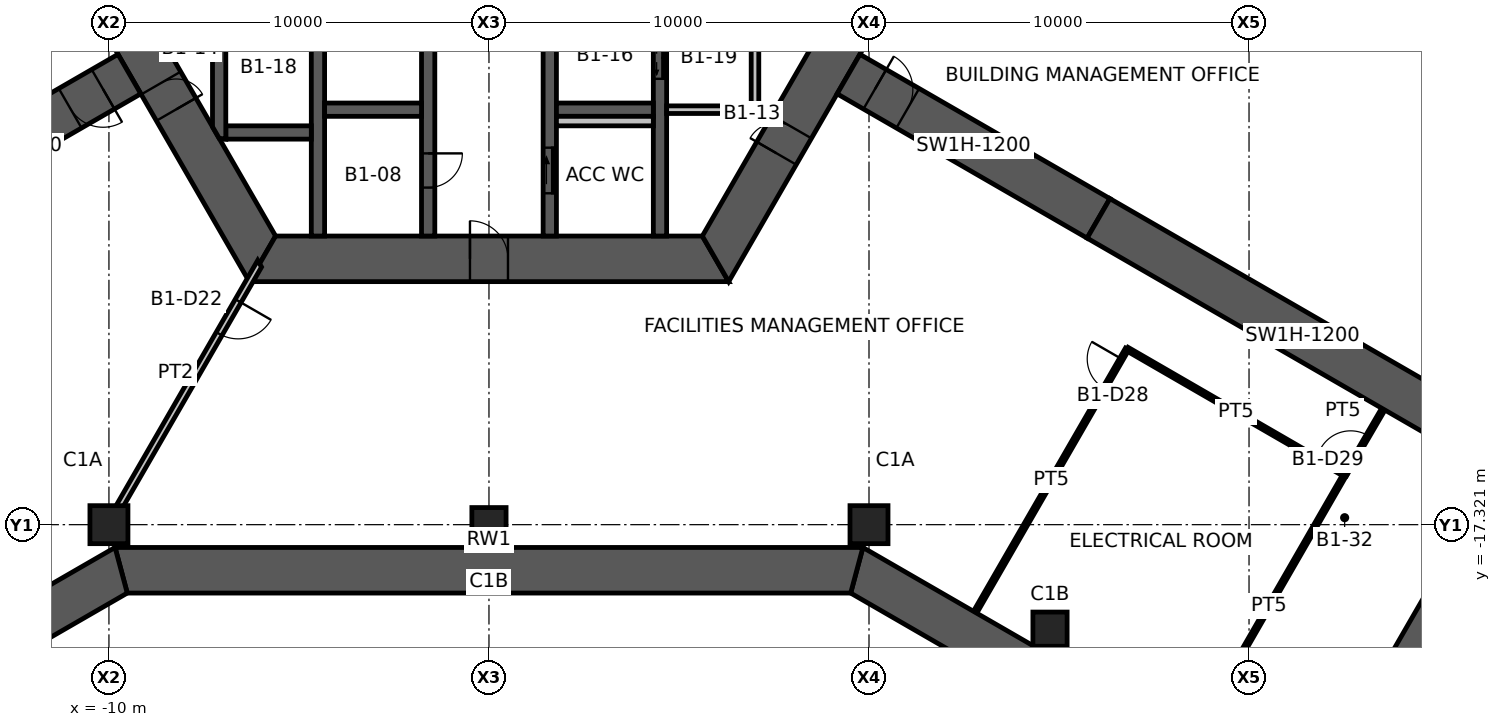
"""IFC4 building model, lengths in metres.
Left out: names, types, materials, properties, quantities, classifications, styles, units other than length and angle.
Written with IfcOpenShell. Run it as: python <this file> out.ifc"""

import sys

from ifc_helpers import new_model, si_unit, direction, frame, frame_2d, origin, origin_2d, place, context, subcontext, project, spatial, polyline, rectangle, hollow_rectangle, outline, extrude, element, fill, save


model = new_model("IFC4")
c1 = context("Model", 3, precision=1e-05, world=origin(), true_north=direction((0.0, 1.0)))
c2 = subcontext(c1, "Body", "Model", "MODEL_VIEW")
j1 = project(units=[si_unit("LENGTHUNIT", "METRE"), si_unit("PLANEANGLEUNIT", "RADIAN")], contexts=[c1])
p1 = place(None, origin())
s1 = spatial("IfcSite", under=j1, at=p1, CompositionType="ELEMENT")
p2 = place(p1, origin())
s2 = spatial("IfcBuilding", under=s1, at=p2, CompositionType="ELEMENT")
p3 = place(p2, frame((0.0, 0.0, -5.0)))
s3 = spatial("IfcBuildingStorey", under=s2, at=p3, CompositionType="ELEMENT", Elevation=-5.0)
for number, where, z_axis, x_axis in (
    (1, (-10.0, -17.321, 0.0), (0.0, 0.0, 1.0), (1.0, 0.0, 0.0)),
    (2, (10.0, -17.321, 0.0), (0.0, 0.0, 1.0), (1.0, 0.0, 0.0)),
):
    element("IfcColumn", number, at=place(p3, frame(where, z_axis=z_axis, x_axis=x_axis)), inside=s3, PredefinedType="COLUMN", context=c2, shape_type="SweptSolid", body=[
        extrude(hollow_rectangle(XDim=1.0, YDim=1.0, WallThickness=0.06, at=origin_2d()), origin(), (0.0, 0.0, 1.0), 5.0),
    ])
for number, where, z_axis, x_axis in (
    (3, (0.0, -17.321, 0.0), (0.0, 0.0, 1.0), (1.0, 0.0, 0.0)),
    (4, (14.763, -20.071, 0.0), (0.0, 0.0, 1.0), (1.0, 0.0, 0.0)),
):
    element("IfcColumn", number, at=place(p3, frame(where, z_axis=z_axis, x_axis=x_axis)), inside=s3, PredefinedType="COLUMN", context=c2, shape_type="SweptSolid", body=[
        extrude(hollow_rectangle(XDim=0.9, YDim=0.9, WallThickness=0.05, at=origin_2d()), origin(), (0.0, 0.0, 1.0), 5.0),
    ])
p4 = place(p3, frame((-11.922, 0.0, 0.0), z_axis=(0.0, 0.0, 1.0), x_axis=(0.500004296715, -0.866022923061, 0.0)))
e5 = element("IfcWall", 5, at=p4, inside=s3, PredefinedType="SHEAR", context=c2, shape_type="SweptSolid", body=[
    extrude(outline(polyline([(-0.346, -0.6), (6.581, -0.6), (7.381, -0.6), (12.269, -0.6), (11.576, 0.6), (7.381, 0.6), (6.581, 0.6), (0.346, 0.6), (-0.346, -0.6)])), origin(), (0.0, 0.0, 1.0), 5.0),
])
p5 = place(p4, frame((6.581, 0.0, 0.0)))
e6 = element("IfcOpeningElement", 6, at=p5, cuts=e5, PredefinedType="OPENING", context=c2, shape_type="SweptSolid", body=[
    extrude(rectangle(XDim=0.8, YDim=2.1, at=frame_2d((0.4, 1.05))), frame((0.0, 0.61, 0.0), z_axis=(0.0, -1.0, 0.0), x_axis=(1.0, 0.0, 0.0)), (0.0, 0.0, 1.0), 1.22),
])
p6 = place(p3, frame((-5.961, -10.325, 0.0), z_axis=(0.0, 0.0, 1.0), x_axis=(1.0, 0.0, 0.0)))
e7 = element("IfcWall", 7, at=p6, inside=s3, PredefinedType="SHEAR", context=c2, shape_type="SweptSolid", body=[
    extrude(outline(polyline([(-0.346, -0.6), (5.461, -0.6), (6.461, -0.6), (12.269, -0.6), (11.576, 0.6), (6.461, 0.6), (5.461, 0.6), (0.346, 0.6), (-0.346, -0.6)])), origin(), (0.0, 0.0, 1.0), 5.0),
])
p7 = place(p6, frame((5.461, 0.0, 0.0)))
e8 = element("IfcOpeningElement", 8, at=p7, cuts=e7, PredefinedType="OPENING", context=c2, shape_type="SweptSolid", body=[
    extrude(rectangle(XDim=1.0, YDim=2.1, at=frame_2d((0.5, 1.05))), frame((0.0, 0.61, 0.0), z_axis=(0.0, -1.0, 0.0), x_axis=(1.0, 0.0, 0.0)), (0.0, 0.0, 1.0), 1.22),
])
p8 = place(p3, frame((5.961, -10.325, 0.0), z_axis=(0.0, 0.0, 1.0), x_axis=(0.500004296715, 0.866022923061, 0.0)))
e9 = element("IfcWall", 9, at=p8, inside=s3, PredefinedType="SHEAR", context=c2, shape_type="SweptSolid", body=[
    extrude(outline(polyline([(-0.346, -0.6), (3.208, -0.6), (4.009, -0.6), (12.269, -0.6), (11.576, 0.6), (4.009, 0.6), (3.208, 0.6), (0.346, 0.6), (-0.346, -0.6)])), origin(), (0.0, 0.0, 1.0), 5.0),
])
p9 = place(p8, frame((3.208, 0.0, 0.0)))
e10 = element("IfcOpeningElement", 10, at=p9, cuts=e9, PredefinedType="OPENING", context=c2, shape_type="SweptSolid", body=[
    extrude(rectangle(XDim=0.8, YDim=2.1, at=frame_2d((0.4, 1.05))), frame((0.0, 0.61, 0.0), z_axis=(0.0, -1.0, 0.0), x_axis=(1.0, 0.0, 0.0)), (0.0, 0.0, 1.0), 1.22),
])
p10 = place(p3, frame((-9.461, -5.462, 0.0), z_axis=(0.0, 0.0, 1.0), x_axis=(-0.866019116917, -0.500010889016, 0.0)))
e11 = element("IfcWall", 11, at=p10, inside=s3, PredefinedType="SHEAR", context=c2, shape_type="SweptSolid", body=[
    extrude(rectangle(XDim=7.595, YDim=1.2, at=frame_2d((3.798, 0.0))), origin(), (0.0, 0.0, 1.0), 5.0),
])
p11 = place(p10, frame((0.8, 0.0, 0.0)))
e12 = element("IfcOpeningElement", 12, at=p11, cuts=e11, PredefinedType="OPENING", context=c2, shape_type="SweptSolid", body=[
    extrude(rectangle(XDim=1.0, YDim=2.1, at=frame_2d((0.5, 1.05))), frame((0.0, 0.61, 0.0), z_axis=(0.0, -1.0, 0.0), x_axis=(1.0, 0.0, 0.0)), (0.0, 0.0, 1.0), 1.22),
])
p12 = place(p3, frame((9.461, -5.462, 0.0), z_axis=(0.0, 0.0, 1.0), x_axis=(0.866019116917, -0.500010889016, 0.0)))
e13 = element("IfcWall", 13, at=p12, inside=s3, PredefinedType="SHEAR", context=c2, shape_type="SweptSolid", body=[
    extrude(rectangle(XDim=7.595, YDim=1.2, at=frame_2d((3.798, 0.0))), origin(), (0.0, 0.0, 1.0), 5.0),
])
p13 = place(p12, frame((0.8, 0.0, 0.0)))
e14 = element("IfcOpeningElement", 14, at=p13, cuts=e13, PredefinedType="OPENING", context=c2, shape_type="SweptSolid", body=[
    extrude(rectangle(XDim=1.0, YDim=2.1, at=frame_2d((0.5, 1.05))), frame((0.0, 0.61, 0.0), z_axis=(0.0, -1.0, 0.0), x_axis=(1.0, 0.0, 0.0)), (0.0, 0.0, 1.0), 1.22),
])
p14 = place(p3, frame((16.039, -9.26, 0.0), z_axis=(0.0, 0.0, 1.0), x_axis=(0.866023285932, -0.50000366821, 0.0)))
e15 = element("IfcWall", 15, at=p14, inside=s3, PredefinedType="SHEAR", context=c2, shape_type="SweptSolid", body=[
    extrude(rectangle(XDim=12.4, YDim=1.2, at=frame_2d((6.2, 0.0))), origin(), (0.0, 0.0, 1.0), 5.0),
])
p15 = place(p3, frame((20.878, 0.878, 0.0), z_axis=(0.0, 0.0, 1.0), x_axis=(0.866028209229, -0.499995140796, 0.0)))
e16 = element("IfcWall", 16, at=p15, inside=s3, PredefinedType="SOLIDWALL", context=c2, shape_type="SweptSolid", body=[
    extrude(outline(polyline([(-0.161, -0.6), (13.279, -0.6), (13.279, 0.6), (0.161, 0.6), (-0.161, -0.6)])), origin(), (0.0, 0.0, 1.0), 5.0),
])
p16 = place(p3, frame((33.198, -5.541, 0.0), z_axis=(0.0, 0.0, 1.0), x_axis=(-0.500005427746, -0.866022270051, 0.0)))
e17 = element("IfcWall", 17, at=p16, inside=s3, PredefinedType="SOLIDWALL", context=c2, shape_type="SweptSolid", body=[
    extrude(rectangle(XDim=23.6, YDim=1.2, at=frame_2d((11.8, 0.0))), origin(), (0.0, 0.0, 1.0), 5.0),
])
p17 = place(p3, frame((21.178, -25.16, 0.0), z_axis=(0.0, 0.0, 1.0), x_axis=(-0.866028209229, 0.499995140796, 0.0)))
e18 = element("IfcWall", 18, at=p17, inside=s3, PredefinedType="SOLIDWALL", context=c2, shape_type="SweptSolid", body=[
    extrude(outline(polyline([(0.0, -0.6), (13.439, -0.6), (13.118, 0.6), (0.0, 0.6), (0.0, -0.6)])), origin(), (0.0, 0.0, 1.0), 5.0),
])
p18 = place(p3, frame((9.678, -18.521, 0.0), z_axis=(0.0, 0.0, 1.0), x_axis=(-1.0, 0.0, 0.0)))
e19 = element("IfcWall", 19, at=p18, inside=s3, PredefinedType="SOLIDWALL", context=c2, shape_type="SweptSolid", body=[
    extrude(outline(polyline([(-0.161, -0.6), (19.518, -0.6), (19.196, 0.6), (0.161, 0.6), (-0.161, -0.6)])), origin(), (0.0, 0.0, 1.0), 5.0),
])
p19 = place(p3, frame((-9.678, -18.521, 0.0), z_axis=(0.0, 0.0, 1.0), x_axis=(-0.866028209229, -0.499995140796, 0.0)))
e20 = element("IfcWall", 20, at=p19, inside=s3, PredefinedType="SOLIDWALL", context=c2, shape_type="SweptSolid", body=[
    extrude(outline(polyline([(-0.161, -0.6), (13.279, -0.6), (13.279, 0.6), (0.161, 0.6), (-0.161, -0.6)])), origin(), (0.0, 0.0, 1.0), 5.0),
])
p20 = place(p3, frame((-1.6, -3.775, 0.0), z_axis=(0.0, 0.0, 1.0), x_axis=(0.0, -1.0, 0.0)))
e21 = element("IfcWall", 21, at=p20, inside=s3, PredefinedType="SHEAR", context=c2, shape_type="SweptSolid", body=[
    extrude(rectangle(XDim=5.95, YDim=0.35, at=frame_2d((2.975, 0.0))), origin(), (0.0, 0.0, 1.0), 5.0),
])
p21 = place(p20, frame((3.775, 0.0, 0.0)))
e22 = element("IfcOpeningElement", 22, at=p21, cuts=e21, PredefinedType="OPENING", context=c2, shape_type="SweptSolid", body=[
    extrude(rectangle(XDim=0.9, YDim=2.1, at=frame_2d((0.45, 1.05))), frame((0.0, 0.185, 0.0), z_axis=(0.0, -1.0, 0.0), x_axis=(1.0, 0.0, 0.0)), (0.0, 0.0, 1.0), 0.37),
])
p22 = place(p3, frame((1.6, -3.775, 0.0), z_axis=(0.0, 0.0, 1.0), x_axis=(0.0, -1.0, 0.0)))
e23 = element("IfcWall", 23, at=p22, inside=s3, PredefinedType="SHEAR", context=c2, shape_type="SweptSolid", body=[
    extrude(rectangle(XDim=5.95, YDim=0.35, at=frame_2d((2.975, 0.0))), origin(), (0.0, 0.0, 1.0), 5.0),
])
p23 = place(p22, frame((3.625, 0.0, 0.0)))
e24 = element("IfcOpeningElement", 24, at=p23, cuts=e23, PredefinedType="OPENING", context=c2, shape_type="SweptSolid", body=[
    extrude(rectangle(XDim=1.2, YDim=2.1, at=frame_2d((0.6, 1.05))), frame((0.0, 0.185, 0.0), z_axis=(0.0, -1.0, 0.0), x_axis=(1.0, 0.0, 0.0)), (0.0, 0.0, 1.0), 0.37),
])
p24 = place(p3, frame((-4.5, -3.775, 0.0), z_axis=(0.0, 0.0, 1.0), x_axis=(0.0, -1.0, 0.0)))
e25 = element("IfcWall", 25, at=p24, inside=s3, PredefinedType="SHEAR", context=c2, shape_type="SweptSolid", body=[
    extrude(rectangle(XDim=5.95, YDim=0.35, at=frame_2d((2.975, 0.0))), origin(), (0.0, 0.0, 1.0), 5.0),
])
p25 = place(p3, frame((4.5, -3.775, 0.0), z_axis=(0.0, 0.0, 1.0), x_axis=(0.0, -1.0, 0.0)))
e26 = element("IfcWall", 26, at=p25, inside=s3, PredefinedType="SHEAR", context=c2, shape_type="SweptSolid", body=[
    extrude(rectangle(XDim=5.95, YDim=0.35, at=frame_2d((2.975, 0.0))), origin(), (0.0, 0.0, 1.0), 5.0),
])
p26 = place(p25, frame((0.712, 0.0, 0.0)))
e27 = element("IfcOpeningElement", 27, at=p26, cuts=e26, PredefinedType="OPENING", context=c2, shape_type="SweptSolid", body=[
    extrude(rectangle(XDim=1.1, YDim=2.1, at=frame_2d((0.55, 1.05))), frame((0.0, 0.185, 0.0), z_axis=(0.0, -1.0, 0.0), x_axis=(1.0, 0.0, 0.0)), (0.0, 0.0, 1.0), 0.37),
])
for number, where, z_axis, x_axis in (
    (28, (-4.325, -6.4, 0.0), (0.0, 0.0, 1.0), (1.0, 0.0, 0.0)),
    (29, (1.775, -6.4, 0.0), (0.0, 0.0, 1.0), (1.0, 0.0, 0.0)),
):
    element("IfcWall", number, at=place(p3, frame(where, z_axis=z_axis, x_axis=x_axis)), inside=s3, PredefinedType="SHEAR", context=c2, shape_type="SweptSolid", body=[
        extrude(rectangle(XDim=2.55, YDim=0.35, at=frame_2d((1.275, 0.0))), origin(), (0.0, 0.0, 1.0), 5.0),
    ])
p27 = place(p3, frame((-6.925, -7.0, 0.0), z_axis=(0.0, 0.0, 1.0), x_axis=(1.0, 0.0, 0.0)))
e30 = element("IfcWall", 30, at=p27, inside=s3, PredefinedType="SHEAR", context=c2, shape_type="SweptSolid", body=[
    extrude(rectangle(XDim=2.25, YDim=0.35, at=frame_2d((1.125, 0.0))), origin(), (0.0, 0.0, 1.0), 5.0),
])
p28 = place(p3, frame((-7.1, -3.775, 0.0), z_axis=(0.0, 0.0, 1.0), x_axis=(0.0, -1.0, 0.0)))
e31 = element("IfcWall", 31, at=p28, inside=s3, PredefinedType="SHEAR", context=c2, shape_type="SweptSolid", body=[
    extrude(outline(polyline([(0.0, -0.175), (3.074, -0.175), (3.377, 0.0), (3.4, 0.175), (0.0, 0.175), (0.0, -0.175)])), origin(), (0.0, 0.0, 1.0), 5.0),
])
p29 = place(p3, frame((4.675, -6.4, 0.0), z_axis=(0.0, 0.0, 1.0), x_axis=(1.0, 0.0, 0.0)))
e32 = element("IfcWall", 32, at=p29, inside=s3, PredefinedType="STANDARD", context=c2, shape_type="SweptSolid", body=[
    extrude(rectangle(XDim=2.425, YDim=0.2, at=frame_2d((1.212, 0.0))), origin(), (0.0, 0.0, 1.0), 5.0),
])
p30 = place(p3, frame((7.0, -3.775, 0.0), z_axis=(0.0, 0.0, 1.0), x_axis=(0.0, -1.0, 0.0)))
e33 = element("IfcWall", 33, at=p30, inside=s3, PredefinedType="STANDARD", context=c2, shape_type="SweptSolid", body=[
    extrude(rectangle(XDim=2.525, YDim=0.2, at=frame_2d((1.263, 0.0))), origin(), (0.0, 0.0, 1.0), 5.0),
])
p31 = place(p3, frame((1.775, -6.7, 0.0), z_axis=(0.0, 0.0, 1.0), x_axis=(1.0, 0.0, 0.0)))
e34 = element("IfcWall", 34, at=p31, inside=s3, PredefinedType="PLUMBINGWALL", context=c2, shape_type="SweptSolid", body=[
    extrude(rectangle(XDim=2.55, YDim=0.25, at=frame_2d((1.275, 0.0))), origin(), (0.0, 0.0, 1.0), 5.0),
])
p32 = place(p3, frame((-6.035, -10.453, 0.0), z_axis=(0.0, 0.0, 1.0), x_axis=(-0.499993402427, -0.866029212861, 0.0)))
e35 = element("IfcWall", 35, at=p32, inside=s3, PredefinedType="PARTITIONING", context=c2, shape_type="SweptSolid", body=[
    extrude(outline(polyline([(-0.051, -0.087), (1.129, -0.087), (2.129, -0.087), (7.93, -0.087), (7.93, 0.087), (2.129, 0.087), (1.129, 0.087), (0.051, 0.087), (-0.051, -0.087)])), origin(), (0.0, 0.0, 1.0), 3.8),
])
p33 = place(p32, frame((1.129, 0.0, 0.0)))
e36 = element("IfcOpeningElement", 36, at=p33, cuts=e35, PredefinedType="OPENING", context=c2, shape_type="SweptSolid", body=[
    extrude(rectangle(XDim=1.0, YDim=2.1, at=frame_2d((0.5, 1.05))), frame((0.0, 0.098, 0.0), z_axis=(0.0, -1.0, 0.0), x_axis=(1.0, 0.0, 0.0)), (0.0, 0.0, 1.0), 0.195),
])
p34 = place(p3, frame((22.52, -16.004, 0.0), z_axis=(0.0, 0.0, 1.0), x_axis=(-0.499396497017, -0.866373556133, 0.0)))
e37 = element("IfcWall", 37, at=p34, inside=s3, PredefinedType="PARTITIONING", context=c2, shape_type="SweptSolid", body=[
    extrude(rectangle(XDim=7.998, YDim=0.1, at=frame_2d((3.999, 0.0))), origin(), (0.0, 0.0, 1.0), 3.7),
])
p35 = place(p3, frame((12.802, -19.608, 0.0), z_axis=(0.0, 0.0, 1.0), x_axis=(0.499998759335, 0.866026120082, 0.0)))
e38 = element("IfcWall", 38, at=p35, inside=s3, PredefinedType="PARTITIONING", context=c2, shape_type="SweptSolid", body=[
    extrude(rectangle(XDim=7.98, YDim=0.1, at=frame_2d((3.99, 0.0))), origin(), (0.0, 0.0, 1.0), 3.7),
])
p36 = place(p35, frame((6.78, 0.0, 0.0)))
e39 = element("IfcOpeningElement", 39, at=p36, cuts=e38, PredefinedType="OPENING", context=c2, shape_type="SweptSolid", body=[
    extrude(rectangle(XDim=0.9, YDim=2.1, at=frame_2d((0.45, 1.05))), frame((0.0, 0.06, 0.0), z_axis=(0.0, -1.0, 0.0), x_axis=(1.0, 0.0, 0.0)), (0.0, 0.0, 1.0), 0.12),
])
p37 = place(p3, frame((16.792, -12.697, 0.0), z_axis=(0.0, 0.0, 1.0), x_axis=(0.865724093718, -0.500521521571, 0.0)))
e40 = element("IfcWall", 40, at=p37, inside=s3, PredefinedType="PARTITIONING", context=c2, shape_type="SweptSolid", body=[
    extrude(rectangle(XDim=6.62, YDim=0.1, at=frame_2d((3.31, 0.0))), origin(), (0.0, 0.0, 1.0), 3.7),
])
p38 = place(p3, frame((22.522, -16.01, 0.0), z_axis=(0.0, 0.0, 1.0), x_axis=(0.504490591108, 0.863417189708, 0.0)))
e41 = element("IfcWall", 41, at=p38, inside=s3, PredefinedType="PARTITIONING", context=c2, shape_type="SweptSolid", body=[
    extrude(rectangle(XDim=1.984, YDim=0.1, at=frame_2d((0.992, 0.0))), origin(), (0.0, 0.0, 1.0), 3.7),
])
p39 = place(p38, frame((0.3, 0.0, 0.0)))
e42 = element("IfcOpeningElement", 42, at=p39, cuts=e41, PredefinedType="OPENING", context=c2, shape_type="SweptSolid", body=[
    extrude(rectangle(XDim=0.9, YDim=2.1, at=frame_2d((0.45, 1.05))), frame((0.0, 0.06, 0.0), z_axis=(0.0, -1.0, 0.0), x_axis=(1.0, 0.0, 0.0)), (0.0, 0.0, 1.0), 0.12),
])
p40 = place(p7, origin())
e43 = element("IfcDoor", 43, at=p40, inside=s3, OperationType="SINGLE_SWING_LEFT", PredefinedType="DOOR", context=c2, shape_type="SweptSolid", body=[
    extrude(rectangle(XDim=1.0, YDim=2.1, at=frame_2d((0.5, 1.05))), frame((0.0, 0.025, 0.0), z_axis=(0.0, -1.0, 0.0), x_axis=(1.0, 0.0, 0.0)), (0.0, 0.0, 1.0), 0.05),
])
fill(e8, e43)
p41 = place(p9, origin())
e44 = element("IfcDoor", 44, at=p41, inside=s3, OperationType="SINGLE_SWING_LEFT", PredefinedType="DOOR", context=c2, shape_type="SweptSolid", body=[
    extrude(rectangle(XDim=0.8, YDim=2.1, at=frame_2d((0.4, 1.05))), frame((0.0, 0.025, 0.0), z_axis=(0.0, -1.0, 0.0), x_axis=(1.0, 0.0, 0.0)), (0.0, 0.0, 1.0), 0.05),
])
fill(e10, e44)
p42 = place(p5, origin())
e45 = element("IfcDoor", 45, at=p42, inside=s3, OperationType="SINGLE_SWING_RIGHT", PredefinedType="DOOR", context=c2, shape_type="SweptSolid", body=[
    extrude(rectangle(XDim=0.8, YDim=2.1, at=frame_2d((0.4, 1.05))), frame((0.0, 0.025, 0.0), z_axis=(0.0, -1.0, 0.0), x_axis=(1.0, 0.0, 0.0)), (0.0, 0.0, 1.0), 0.05),
])
fill(e6, e45)
p43 = place(p23, origin())
e46 = element("IfcDoor", 46, at=p43, inside=s3, OperationType="SLIDING_TO_LEFT", PredefinedType="DOOR", context=c2, shape_type="SweptSolid", body=[
    extrude(rectangle(XDim=1.2, YDim=2.1, at=frame_2d((0.6, 1.05))), frame((0.0, 0.025, 0.0), z_axis=(0.0, -1.0, 0.0), x_axis=(1.0, 0.0, 0.0)), (0.0, 0.0, 1.0), 0.05),
])
fill(e24, e46)
p44 = place(p21, origin())
e47 = element("IfcDoor", 47, at=p44, inside=s3, OperationType="SINGLE_SWING_LEFT", PredefinedType="DOOR", context=c2, shape_type="SweptSolid", body=[
    extrude(rectangle(XDim=0.9, YDim=2.1, at=frame_2d((0.45, 1.05))), frame((0.0, 0.025, 0.0), z_axis=(0.0, -1.0, 0.0), x_axis=(1.0, 0.0, 0.0)), (0.0, 0.0, 1.0), 0.05),
])
fill(e22, e47)
p45 = place(p11, origin())
e48 = element("IfcDoor", 48, at=p45, inside=s3, OperationType="SINGLE_SWING_LEFT", PredefinedType="DOOR", context=c2, shape_type="SweptSolid", body=[
    extrude(rectangle(XDim=1.0, YDim=2.1, at=frame_2d((0.5, 1.05))), frame((0.0, 0.025, 0.0), z_axis=(0.0, -1.0, 0.0), x_axis=(1.0, 0.0, 0.0)), (0.0, 0.0, 1.0), 0.05),
])
fill(e12, e48)
p46 = place(p13, origin())
e49 = element("IfcDoor", 49, at=p46, inside=s3, OperationType="SINGLE_SWING_LEFT", PredefinedType="DOOR", context=c2, shape_type="SweptSolid", body=[
    extrude(rectangle(XDim=1.0, YDim=2.1, at=frame_2d((0.5, 1.05))), frame((0.0, 0.025, 0.0), z_axis=(0.0, -1.0, 0.0), x_axis=(1.0, 0.0, 0.0)), (0.0, 0.0, 1.0), 0.05),
])
fill(e14, e49)
p47 = place(p33, origin())
e50 = element("IfcDoor", 50, at=p47, inside=s3, OperationType="SINGLE_SWING_LEFT", PredefinedType="DOOR", context=c2, shape_type="SweptSolid", body=[
    extrude(rectangle(XDim=1.0, YDim=2.1, at=frame_2d((0.5, 1.05))), frame((0.0, 0.025, 0.0), z_axis=(0.0, -1.0, 0.0), x_axis=(1.0, 0.0, 0.0)), (0.0, 0.0, 1.0), 0.05),
])
fill(e36, e50)
p48 = place(p36, origin())
e51 = element("IfcDoor", 51, at=p48, inside=s3, OperationType="SINGLE_SWING_RIGHT", PredefinedType="DOOR", context=c2, shape_type="SweptSolid", body=[
    extrude(rectangle(XDim=0.9, YDim=2.1, at=frame_2d((0.45, 1.05))), frame((0.0, 0.025, 0.0), z_axis=(0.0, -1.0, 0.0), x_axis=(1.0, 0.0, 0.0)), (0.0, 0.0, 1.0), 0.05),
])
fill(e39, e51)
p49 = place(p39, origin())
e52 = element("IfcDoor", 52, at=p49, inside=s3, OperationType="SINGLE_SWING_LEFT", PredefinedType="DOOR", context=c2, shape_type="SweptSolid", body=[
    extrude(rectangle(XDim=0.9, YDim=2.1, at=frame_2d((0.45, 1.05))), frame((0.0, 0.025, 0.0), z_axis=(0.0, -1.0, 0.0), x_axis=(1.0, 0.0, 0.0)), (0.0, 0.0, 1.0), 0.05),
])
fill(e42, e52)
p50 = place(p26, origin())
e53 = element("IfcDoor", 53, at=p50, inside=s3, OperationType="DOUBLE_DOOR_SLIDING", PredefinedType="DOOR", context=c2, shape_type="SweptSolid", body=[
    extrude(rectangle(XDim=1.1, YDim=2.1, at=frame_2d((0.55, 1.05))), frame((0.0, 0.025, 0.0), z_axis=(0.0, -1.0, 0.0), x_axis=(1.0, 0.0, 0.0)), (0.0, 0.0, 1.0), 0.05),
])
fill(e27, e53)
save(model, sys.argv[1])
